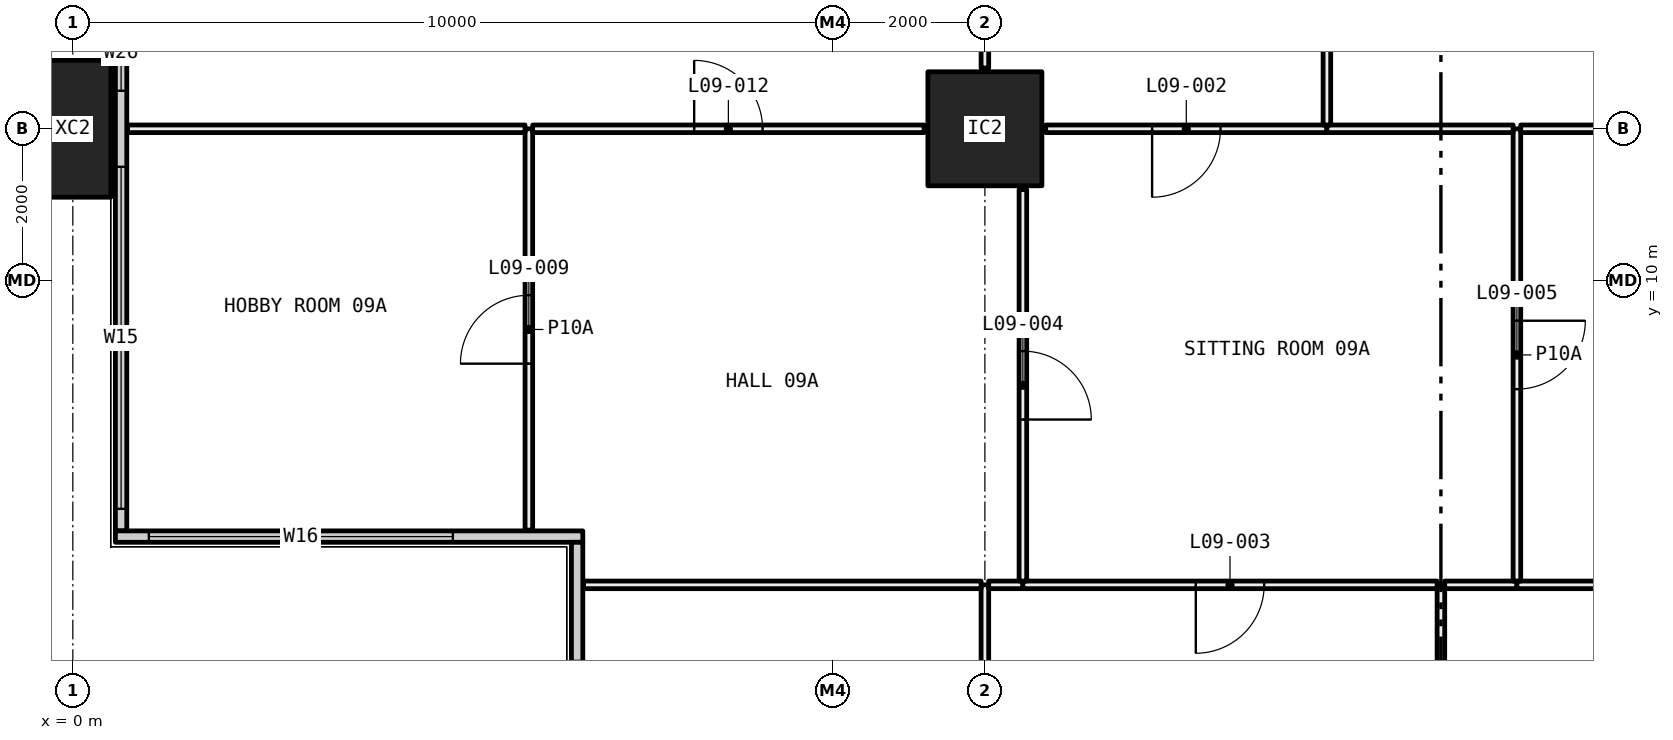
"""IFC4 building model, lengths in metres.
Left out: names, types, materials, properties, quantities, classifications, styles, units other than length and angle.
Written with IfcOpenShell. Run it as: python <this file> out.ifc"""

import sys

from ifc_helpers import new_model, si_unit, direction, frame, frame_2d, origin, origin_2d, place, context, subcontext, project, spatial, rectangle, hollow_rectangle, extrude, element, fill, save


model = new_model("IFC4")
c1 = context("Model", 3, precision=1e-05, world=origin(), true_north=direction((0.0, 1.0)))
c2 = subcontext(c1, "Body", "Model", "MODEL_VIEW")
j1 = project(units=[si_unit("LENGTHUNIT", "METRE"), si_unit("PLANEANGLEUNIT", "RADIAN")], contexts=[c1])
p1 = place(None, origin())
s1 = spatial("IfcSite", under=j1, at=p1, CompositionType="ELEMENT")
p2 = place(p1, origin())
s2 = spatial("IfcBuilding", under=s1, at=p2, CompositionType="ELEMENT")
p3 = place(p2, frame((0.0, 0.0, 43.8)))
s3 = spatial("IfcBuildingStorey", under=s2, at=p3, CompositionType="ELEMENT", Elevation=43.8)
p4 = place(p3, frame((0.0, 12.0, -0.4), z_axis=(0.0, 0.0, 1.0), x_axis=(0.0, 1.0, 0.0)))
e1 = element("IfcColumn", 1, at=p4, inside=s3, PredefinedType="COLUMN", context=c2, shape_type="SweptSolid", body=[
    extrude(hollow_rectangle(XDim=1.8, YDim=1.0, WallThickness=0.07, at=origin_2d()), origin(), (0.0, 0.0, 1.0), 3.45),
])
p5 = place(p3, frame((12.0, 12.0, 0.0), z_axis=(0.0, 0.0, 1.0), x_axis=(1.0, 0.0, 0.0)))
e2 = element("IfcColumn", 2, at=p5, inside=s3, PredefinedType="COLUMN", context=c2, shape_type="SweptSolid", body=[
    extrude(hollow_rectangle(XDim=1.5, YDim=1.5, WallThickness=0.065, at=origin_2d()), origin(), (0.0, 0.0, 1.0), 3.05),
])
p6 = place(p3, frame((0.635, 6.71, 0.0), z_axis=(0.0, 0.0, 1.0), x_axis=(0.0, 1.0, 0.0)))
e3 = element("IfcWall", 3, at=p6, inside=s3, PredefinedType="ELEMENTEDWALL", context=c2, shape_type="SweptSolid", body=[
    extrude(rectangle(XDim=34.58, YDim=0.15, at=frame_2d((17.29, 0.0))), origin(), (0.0, 0.0, 1.0), 3.05),
])
p7 = place(p6, frame((0.29, 0.0, 0.45)))
e4 = element("IfcOpeningElement", 4, at=p7, cuts=e3, PredefinedType="OPENING", context=c2, shape_type="SweptSolid", body=[
    extrude(rectangle(XDim=4.5, YDim=2.55, at=frame_2d((2.25, 1.275))), frame((0.0, 0.085, 0.0), z_axis=(0.0, -1.0, 0.0), x_axis=(1.0, 0.0, 0.0)), (0.0, 0.0, 1.0), 0.17),
])
p8 = place(p6, frame((5.79, 0.0, 0.45)))
e5 = element("IfcOpeningElement", 5, at=p8, cuts=e3, PredefinedType="OPENING", context=c2, shape_type="SweptSolid", body=[
    extrude(rectangle(XDim=1.0, YDim=2.55, at=frame_2d((0.5, 1.275))), frame((0.0, 0.085, 0.0), z_axis=(0.0, -1.0, 0.0), x_axis=(1.0, 0.0, 0.0)), (0.0, 0.0, 1.0), 0.17),
])
p9 = place(p6, frame((9.54, 0.0, 0.45)))
e6 = element("IfcOpeningElement", 6, at=p9, cuts=e3, PredefinedType="OPENING", context=c2, shape_type="SweptSolid", body=[
    extrude(rectangle(XDim=1.25, YDim=2.55, at=frame_2d((0.625, 1.275))), frame((0.0, 0.085, 0.0), z_axis=(0.0, -1.0, 0.0), x_axis=(1.0, 0.0, 0.0)), (0.0, 0.0, 1.0), 0.17),
])
p10 = place(p6, frame((11.79, 0.0, 0.45)))
e7 = element("IfcOpeningElement", 7, at=p10, cuts=e3, PredefinedType="OPENING", context=c2, shape_type="SweptSolid", body=[
    extrude(rectangle(XDim=1.25, YDim=2.55, at=frame_2d((0.625, 1.275))), frame((0.0, 0.085, 0.0), z_axis=(0.0, -1.0, 0.0), x_axis=(1.0, 0.0, 0.0)), (0.0, 0.0, 1.0), 0.17),
])
p11 = place(p6, frame((15.79, 0.0, 0.45)))
e8 = element("IfcOpeningElement", 8, at=p11, cuts=e3, PredefinedType="OPENING", context=c2, shape_type="SweptSolid", body=[
    extrude(rectangle(XDim=1.0, YDim=2.55, at=frame_2d((0.5, 1.275))), frame((0.0, 0.085, 0.0), z_axis=(0.0, -1.0, 0.0), x_axis=(1.0, 0.0, 0.0)), (0.0, 0.0, 1.0), 0.17),
])
p12 = place(p6, frame((17.79, 0.0, 0.45)))
e9 = element("IfcOpeningElement", 9, at=p12, cuts=e3, PredefinedType="OPENING", context=c2, shape_type="SweptSolid", body=[
    extrude(rectangle(XDim=1.0, YDim=2.55, at=frame_2d((0.5, 1.275))), frame((0.0, 0.085, 0.0), z_axis=(0.0, -1.0, 0.0), x_axis=(1.0, 0.0, 0.0)), (0.0, 0.0, 1.0), 0.17),
])
p13 = place(p6, frame((21.54, 0.0, 0.45)))
e10 = element("IfcOpeningElement", 10, at=p13, cuts=e3, PredefinedType="OPENING", context=c2, shape_type="SweptSolid", body=[
    extrude(rectangle(XDim=1.25, YDim=2.55, at=frame_2d((0.625, 1.275))), frame((0.0, 0.085, 0.0), z_axis=(0.0, -1.0, 0.0), x_axis=(1.0, 0.0, 0.0)), (0.0, 0.0, 1.0), 0.17),
])
p14 = place(p6, frame((23.79, 0.0, 0.45)))
e11 = element("IfcOpeningElement", 11, at=p14, cuts=e3, PredefinedType="OPENING", context=c2, shape_type="SweptSolid", body=[
    extrude(rectangle(XDim=1.25, YDim=2.55, at=frame_2d((0.625, 1.275))), frame((0.0, 0.085, 0.0), z_axis=(0.0, -1.0, 0.0), x_axis=(1.0, 0.0, 0.0)), (0.0, 0.0, 1.0), 0.17),
])
p15 = place(p6, frame((27.79, 0.0, 0.45)))
e12 = element("IfcOpeningElement", 12, at=p15, cuts=e3, PredefinedType="OPENING", context=c2, shape_type="SweptSolid", body=[
    extrude(rectangle(XDim=1.0, YDim=2.55, at=frame_2d((0.5, 1.275))), frame((0.0, 0.085, 0.0), z_axis=(0.0, -1.0, 0.0), x_axis=(1.0, 0.0, 0.0)), (0.0, 0.0, 1.0), 0.17),
])
p16 = place(p6, frame((29.79, 0.0, 0.45)))
e13 = element("IfcOpeningElement", 13, at=p16, cuts=e3, PredefinedType="OPENING", context=c2, shape_type="SweptSolid", body=[
    extrude(rectangle(XDim=4.5, YDim=2.55, at=frame_2d((2.25, 1.275))), frame((0.0, 0.085, 0.0), z_axis=(0.0, -1.0, 0.0), x_axis=(1.0, 0.0, 0.0)), (0.0, 0.0, 1.0), 0.17),
])
p17 = place(p3, frame((0.56, 6.635, 0.0), z_axis=(0.0, 0.0, 1.0), x_axis=(1.0, 0.0, 0.0)))
e14 = element("IfcWall", 14, at=p17, inside=s3, PredefinedType="ELEMENTEDWALL", context=c2, shape_type="SweptSolid", body=[
    extrude(rectangle(XDim=6.15, YDim=0.15, at=frame_2d((3.075, 0.0))), origin(), (0.0, 0.0, 1.0), 3.05),
])
p18 = place(p17, frame((0.44, 0.0, 0.45)))
e15 = element("IfcOpeningElement", 15, at=p18, cuts=e14, PredefinedType="OPENING", context=c2, shape_type="SweptSolid", body=[
    extrude(rectangle(XDim=4.0, YDim=2.55, at=frame_2d((2.0, 1.275))), frame((0.0, 0.085, 0.0), z_axis=(0.0, -1.0, 0.0), x_axis=(1.0, 0.0, 0.0)), (0.0, 0.0, 1.0), 0.17),
])
p19 = place(p3, frame((6.635, 0.71, 0.0), z_axis=(0.0, 0.0, 1.0), x_axis=(0.0, 1.0, 0.0)))
e16 = element("IfcWall", 16, at=p19, inside=s3, PredefinedType="ELEMENTEDWALL", context=c2, shape_type="SweptSolid", body=[
    extrude(rectangle(XDim=5.85, YDim=0.15, at=frame_2d((2.925, 0.0))), origin(), (0.0, 0.0, 1.0), 3.05),
])
p20 = place(p19, frame((0.29, 0.0, 0.45)))
e17 = element("IfcOpeningElement", 17, at=p20, cuts=e16, PredefinedType="OPENING", context=c2, shape_type="SweptSolid", body=[
    extrude(rectangle(XDim=4.0, YDim=2.55, at=frame_2d((2.0, 1.275))), frame((0.0, 0.085, 0.0), z_axis=(0.0, -1.0, 0.0), x_axis=(1.0, 0.0, 0.0)), (0.0, 0.0, 1.0), 0.17),
])
p21 = place(p3, frame((12.0, 0.72, 0.0), z_axis=(0.0, 0.0, 1.0), x_axis=(0.0, 1.0, 0.0)))
e18 = element("IfcWall", 18, at=p21, inside=s3, PredefinedType="PARTITIONING", context=c2, shape_type="SweptSolid", body=[
    extrude(rectangle(XDim=5.28, YDim=0.1, at=frame_2d((2.64, 0.0))), origin(), (0.0, 0.0, 1.0), 2.45),
])
p22 = place(p21, frame((2.19, 0.0, 0.0)))
e19 = element("IfcOpeningElement", 19, at=p22, cuts=e18, PredefinedType="OPENING", context=c2, shape_type="SweptSolid", body=[
    extrude(rectangle(XDim=0.9, YDim=2.1, at=frame_2d((0.45, 1.05))), frame((0.0, 0.06, 0.0), z_axis=(0.0, -1.0, 0.0), x_axis=(1.0, 0.0, 0.0)), (0.0, 0.0, 1.0), 0.12),
])
p23 = place(p3, frame((11.95, 6.0, 0.0), z_axis=(0.0, 0.0, 1.0), x_axis=(-1.0, 0.0, 0.0)))
e20 = element("IfcWall", 20, at=p23, inside=s3, PredefinedType="PARTITIONING", context=c2, shape_type="SweptSolid", body=[
    extrude(rectangle(XDim=5.23, YDim=0.1, at=frame_2d((2.615, 0.0))), origin(), (0.0, 0.0, 1.0), 2.45),
])
p24 = place(p3, frame((18.0, 0.72, 0.0), z_axis=(0.0, 0.0, 1.0), x_axis=(0.0, 1.0, 0.0)))
e21 = element("IfcWall", 21, at=p24, inside=s3, PredefinedType="PARTITIONING", context=c2, shape_type="SweptSolid", body=[
    extrude(rectangle(XDim=5.28, YDim=0.1, at=frame_2d((2.64, 0.0))), origin(), (0.0, 0.0, 1.0), 3.05),
])
p25 = place(p24, frame((2.19, 0.0, 0.0)))
e22 = element("IfcOpeningElement", 22, at=p25, cuts=e21, PredefinedType="OPENING", context=c2, shape_type="SweptSolid", body=[
    extrude(rectangle(XDim=0.9, YDim=2.1, at=frame_2d((0.45, 1.05))), frame((0.0, 0.06, 0.0), z_axis=(0.0, -1.0, 0.0), x_axis=(1.0, 0.0, 0.0)), (0.0, 0.0, 1.0), 0.12),
])
p26 = place(p3, frame((12.5, 6.0, 0.0), z_axis=(0.0, 0.0, 1.0), x_axis=(-1.0, 0.0, 0.0)))
e23 = element("IfcWall", 23, at=p26, inside=s3, PredefinedType="PARTITIONING", context=c2, shape_type="SweptSolid", body=[
    extrude(rectangle(XDim=0.45, YDim=0.1, at=frame_2d((0.225, 0.0))), origin(), (0.0, 0.0, 1.0), 2.45),
])
p27 = place(p3, frame((17.95, 6.0, 0.0), z_axis=(0.0, 0.0, 1.0), x_axis=(-1.0, 0.0, 0.0)))
e24 = element("IfcWall", 24, at=p27, inside=s3, PredefinedType="PARTITIONING", context=c2, shape_type="SweptSolid", body=[
    extrude(rectangle(XDim=5.45, YDim=0.1, at=frame_2d((2.725, 0.0))), origin(), (0.0, 0.0, 1.0), 3.05),
])
p28 = place(p27, frame((2.275, 0.0, 0.0)))
e25 = element("IfcOpeningElement", 25, at=p28, cuts=e24, PredefinedType="OPENING", context=c2, shape_type="SweptSolid", body=[
    extrude(rectangle(XDim=0.9, YDim=2.1, at=frame_2d((0.45, 1.05))), frame((0.0, 0.06, 0.0), z_axis=(0.0, -1.0, 0.0), x_axis=(1.0, 0.0, 0.0)), (0.0, 0.0, 1.0), 0.12),
])
p29 = place(p3, frame((19.0, 6.0, 0.0), z_axis=(0.0, 0.0, 1.0), x_axis=(-1.0, 0.0, 0.0)))
e26 = element("IfcWall", 26, at=p29, inside=s3, PredefinedType="PARTITIONING", context=c2, shape_type="SweptSolid", body=[
    extrude(rectangle(XDim=0.95, YDim=0.1, at=frame_2d((0.475, 0.0))), origin(), (0.0, 0.0, 1.0), 3.05),
])
p30 = place(p3, frame((23.95, 6.0, 0.0), z_axis=(0.0, 0.0, 1.0), x_axis=(-1.0, 0.0, 0.0)))
e27 = element("IfcWall", 27, at=p30, inside=s3, PredefinedType="PARTITIONING", context=c2, shape_type="SweptSolid", body=[
    extrude(rectangle(XDim=4.95, YDim=0.1, at=frame_2d((2.475, 0.0))), origin(), (0.0, 0.0, 1.0), 2.45),
])
p31 = place(p3, frame((6.0, 6.72, 0.0), z_axis=(0.0, 0.0, 1.0), x_axis=(0.0, 1.0, 0.0)))
e28 = element("IfcWall", 28, at=p31, inside=s3, PredefinedType="PARTITIONING", context=c2, shape_type="SweptSolid", body=[
    extrude(rectangle(XDim=5.28, YDim=0.1, at=frame_2d((2.64, 0.0))), origin(), (0.0, 0.0, 1.0), 2.45),
])
p32 = place(p31, frame((2.19, 0.0, 0.0)))
e29 = element("IfcOpeningElement", 29, at=p32, cuts=e28, PredefinedType="OPENING", context=c2, shape_type="SweptSolid", body=[
    extrude(rectangle(XDim=0.9, YDim=2.1, at=frame_2d((0.45, 1.05))), frame((0.0, 0.06, 0.0), z_axis=(0.0, -1.0, 0.0), x_axis=(1.0, 0.0, 0.0)), (0.0, 0.0, 1.0), 0.12),
])
p33 = place(p3, frame((5.95, 12.0, 0.0), z_axis=(0.0, 0.0, 1.0), x_axis=(-1.0, 0.0, 0.0)))
e30 = element("IfcWall", 30, at=p33, inside=s3, PredefinedType="PARTITIONING", context=c2, shape_type="SweptSolid", body=[
    extrude(rectangle(XDim=5.23, YDim=0.1, at=frame_2d((2.615, 0.0))), origin(), (0.0, 0.0, 1.0), 2.45),
])
p34 = place(p3, frame((12.5, 6.05, 0.0), z_axis=(0.0, 0.0, 1.0), x_axis=(0.0, 1.0, 0.0)))
e31 = element("IfcWall", 31, at=p34, inside=s3, PredefinedType="PARTITIONING", context=c2, shape_type="SweptSolid", body=[
    extrude(rectangle(XDim=5.15, YDim=0.1, at=frame_2d((2.575, 0.0))), origin(), (0.0, 0.0, 1.0), 3.05),
])
p35 = place(p34, frame((2.125, 0.0, 0.0)))
e32 = element("IfcOpeningElement", 32, at=p35, cuts=e31, PredefinedType="OPENING", context=c2, shape_type="SweptSolid", body=[
    extrude(rectangle(XDim=0.9, YDim=2.1, at=frame_2d((0.45, 1.05))), frame((0.0, 0.06, 0.0), z_axis=(0.0, -1.0, 0.0), x_axis=(1.0, 0.0, 0.0)), (0.0, 0.0, 1.0), 0.12),
])
p36 = place(p3, frame((11.2, 12.0, 0.0), z_axis=(0.0, 0.0, 1.0), x_axis=(-1.0, 0.0, 0.0)))
e33 = element("IfcWall", 33, at=p36, inside=s3, PredefinedType="PARTITIONING", context=c2, shape_type="SweptSolid", body=[
    extrude(rectangle(XDim=5.15, YDim=0.1, at=frame_2d((2.575, 0.0))), origin(), (0.0, 0.0, 1.0), 2.45),
])
p37 = place(p36, frame((2.125, 0.0, 0.0)))
e34 = element("IfcOpeningElement", 34, at=p37, cuts=e33, PredefinedType="OPENING", context=c2, shape_type="SweptSolid", body=[
    extrude(rectangle(XDim=0.9, YDim=2.1, at=frame_2d((0.45, 1.05))), frame((0.0, 0.06, 0.0), z_axis=(0.0, -1.0, 0.0), x_axis=(1.0, 0.0, 0.0)), (0.0, 0.0, 1.0), 0.12),
])
p38 = place(p3, frame((19.0, 6.05, 0.0), z_axis=(0.0, 0.0, 1.0), x_axis=(0.0, 1.0, 0.0)))
e35 = element("IfcWall", 35, at=p38, inside=s3, PredefinedType="PARTITIONING", context=c2, shape_type="SweptSolid", body=[
    extrude(rectangle(XDim=5.95, YDim=0.1, at=frame_2d((2.975, 0.0))), origin(), (0.0, 0.0, 1.0), 2.45),
])
p39 = place(p38, frame((2.525, 0.0, 0.0)))
e36 = element("IfcOpeningElement", 36, at=p39, cuts=e35, PredefinedType="OPENING", context=c2, shape_type="SweptSolid", body=[
    extrude(rectangle(XDim=0.9, YDim=2.1, at=frame_2d((0.45, 1.05))), frame((0.0, 0.06, 0.0), z_axis=(0.0, -1.0, 0.0), x_axis=(1.0, 0.0, 0.0)), (0.0, 0.0, 1.0), 0.12),
])
p40 = place(p3, frame((16.5, 12.0, 0.0), z_axis=(0.0, 0.0, 1.0), x_axis=(-1.0, 0.0, 0.0)))
e37 = element("IfcWall", 37, at=p40, inside=s3, PredefinedType="PARTITIONING", context=c2, shape_type="SweptSolid", body=[
    extrude(rectangle(XDim=3.7, YDim=0.1, at=frame_2d((1.85, 0.0))), origin(), (0.0, 0.0, 1.0), 2.45),
])
p41 = place(p40, frame((1.4, 0.0, 0.0)))
e38 = element("IfcOpeningElement", 38, at=p41, cuts=e37, PredefinedType="OPENING", context=c2, shape_type="SweptSolid", body=[
    extrude(rectangle(XDim=0.9, YDim=2.1, at=frame_2d((0.45, 1.05))), frame((0.0, 0.06, 0.0), z_axis=(0.0, -1.0, 0.0), x_axis=(1.0, 0.0, 0.0)), (0.0, 0.0, 1.0), 0.12),
])
p42 = place(p3, frame((18.95, 12.0, 0.0), z_axis=(0.0, 0.0, 1.0), x_axis=(-1.0, 0.0, 0.0)))
e39 = element("IfcWall", 39, at=p42, inside=s3, PredefinedType="PARTITIONING", context=c2, shape_type="SweptSolid", body=[
    extrude(rectangle(XDim=2.45, YDim=0.1, at=frame_2d((1.225, 0.0))), origin(), (0.0, 0.0, 1.0), 2.45),
])
p43 = place(p3, frame((23.2, 12.0, 0.0), z_axis=(0.0, 0.0, 1.0), x_axis=(-1.0, 0.0, 0.0)))
e40 = element("IfcWall", 40, at=p43, inside=s3, PredefinedType="PARTITIONING", context=c2, shape_type="SweptSolid", body=[
    extrude(rectangle(XDim=4.15, YDim=0.1, at=frame_2d((2.075, 0.0))), origin(), (0.0, 0.0, 1.0), 2.45),
])
p44 = place(p3, frame((12.0, 12.8, 0.0), z_axis=(0.0, 0.0, 1.0), x_axis=(0.0, 1.0, 0.0)))
e41 = element("IfcWall", 41, at=p44, inside=s3, PredefinedType="PARTITIONING", context=c2, shape_type="SweptSolid", body=[
    extrude(rectangle(XDim=5.1, YDim=0.1, at=frame_2d((2.55, 0.0))), origin(), (0.0, 0.0, 1.0), 3.05),
])
p45 = place(p3, frame((16.5, 12.05, 0.0), z_axis=(0.0, 0.0, 1.0), x_axis=(0.0, 1.0, 0.0)))
e42 = element("IfcWall", 42, at=p45, inside=s3, PredefinedType="PARTITIONING", context=c2, shape_type="SweptSolid", body=[
    extrude(rectangle(XDim=5.85, YDim=0.1, at=frame_2d((2.925, 0.0))), origin(), (0.0, 0.0, 1.0), 2.45),
])
p46 = place(p45, frame((2.475, 0.0, 0.0)))
e43 = element("IfcOpeningElement", 43, at=p46, cuts=e42, PredefinedType="OPENING", context=c2, shape_type="SweptSolid", body=[
    extrude(rectangle(XDim=0.9, YDim=2.1, at=frame_2d((0.45, 1.05))), frame((0.0, 0.06, 0.0), z_axis=(0.0, -1.0, 0.0), x_axis=(1.0, 0.0, 0.0)), (0.0, 0.0, 1.0), 0.12),
])
p47 = place(p7, origin())
e44 = element("IfcWindow", 44, at=p47, inside=s3, PartitioningType="SINGLE_PANEL", PredefinedType="WINDOW", context=c2, shape_type="SweptSolid", body=[
    extrude(rectangle(XDim=4.5, YDim=2.55, at=frame_2d((2.25, 1.275))), frame((0.0, 0.03, 0.0), z_axis=(0.0, -1.0, 0.0), x_axis=(1.0, 0.0, 0.0)), (0.0, 0.0, 1.0), 0.06),
])
fill(e4, e44)
p48 = place(p8, origin())
e45 = element("IfcWindow", 45, at=p48, inside=s3, PartitioningType="SINGLE_PANEL", PredefinedType="WINDOW", context=c2, shape_type="SweptSolid", body=[
    extrude(rectangle(XDim=1.0, YDim=2.55, at=frame_2d((0.5, 1.275))), frame((0.0, 0.03, 0.0), z_axis=(0.0, -1.0, 0.0), x_axis=(1.0, 0.0, 0.0)), (0.0, 0.0, 1.0), 0.06),
])
fill(e5, e45)
p49 = place(p18, origin())
e46 = element("IfcWindow", 46, at=p49, inside=s3, PartitioningType="SINGLE_PANEL", PredefinedType="WINDOW", context=c2, shape_type="SweptSolid", body=[
    extrude(rectangle(XDim=4.0, YDim=2.55, at=frame_2d((2.0, 1.275))), frame((0.0, 0.03, 0.0), z_axis=(0.0, -1.0, 0.0), x_axis=(1.0, 0.0, 0.0)), (0.0, 0.0, 1.0), 0.06),
])
fill(e15, e46)
p50 = place(p41, origin())
e47 = element("IfcDoor", 47, at=p50, inside=s3, OperationType="SINGLE_SWING_LEFT", PredefinedType="DOOR", context=c2, shape_type="SweptSolid", body=[
    extrude(rectangle(XDim=0.9, YDim=2.1, at=frame_2d((0.45, 1.05))), frame((0.0, 0.025, 0.0), z_axis=(0.0, -1.0, 0.0), x_axis=(1.0, 0.0, 0.0)), (0.0, 0.0, 1.0), 0.05),
])
fill(e38, e47)
p51 = place(p28, origin())
e48 = element("IfcDoor", 48, at=p51, inside=s3, OperationType="SINGLE_SWING_LEFT", PredefinedType="DOOR", context=c2, shape_type="SweptSolid", body=[
    extrude(rectangle(XDim=0.9, YDim=2.1, at=frame_2d((0.45, 1.05))), frame((0.0, 0.025, 0.0), z_axis=(0.0, -1.0, 0.0), x_axis=(1.0, 0.0, 0.0)), (0.0, 0.0, 1.0), 0.05),
])
fill(e25, e48)
p52 = place(p35, frame((0.9, 0.0, 0.0), x_axis=(-1.0, 0.0, 0.0)))
e49 = element("IfcDoor", 49, at=p52, inside=s3, OperationType="SINGLE_SWING_LEFT", PredefinedType="DOOR", context=c2, shape_type="SweptSolid", body=[
    extrude(rectangle(XDim=0.9, YDim=2.1, at=frame_2d((0.45, 1.05))), frame((0.0, 0.025, 0.0), z_axis=(0.0, -1.0, 0.0), x_axis=(1.0, 0.0, 0.0)), (0.0, 0.0, 1.0), 0.05),
])
fill(e32, e49)
p53 = place(p39, frame((0.9, 0.0, 0.0), x_axis=(-1.0, 0.0, 0.0)))
e50 = element("IfcDoor", 50, at=p53, inside=s3, OperationType="SINGLE_SWING_RIGHT", PredefinedType="DOOR", context=c2, shape_type="SweptSolid", body=[
    extrude(rectangle(XDim=0.9, YDim=2.1, at=frame_2d((0.45, 1.05))), frame((0.0, 0.025, 0.0), z_axis=(0.0, -1.0, 0.0), x_axis=(1.0, 0.0, 0.0)), (0.0, 0.0, 1.0), 0.05),
])
fill(e36, e50)
p54 = place(p32, origin())
e51 = element("IfcDoor", 51, at=p54, inside=s3, OperationType="SINGLE_SWING_RIGHT", PredefinedType="DOOR", context=c2, shape_type="SweptSolid", body=[
    extrude(rectangle(XDim=0.9, YDim=2.1, at=frame_2d((0.45, 1.05))), frame((0.0, 0.025, 0.0), z_axis=(0.0, -1.0, 0.0), x_axis=(1.0, 0.0, 0.0)), (0.0, 0.0, 1.0), 0.05),
])
fill(e29, e51)
p55 = place(p37, frame((0.9, 0.0, 0.0), x_axis=(-1.0, 0.0, 0.0)))
e52 = element("IfcDoor", 52, at=p55, inside=s3, OperationType="SINGLE_SWING_RIGHT", PredefinedType="DOOR", context=c2, shape_type="SweptSolid", body=[
    extrude(rectangle(XDim=0.9, YDim=2.1, at=frame_2d((0.45, 1.05))), frame((0.0, 0.025, 0.0), z_axis=(0.0, -1.0, 0.0), x_axis=(1.0, 0.0, 0.0)), (0.0, 0.0, 1.0), 0.05),
])
fill(e34, e52)
save(model, sys.argv[1])
